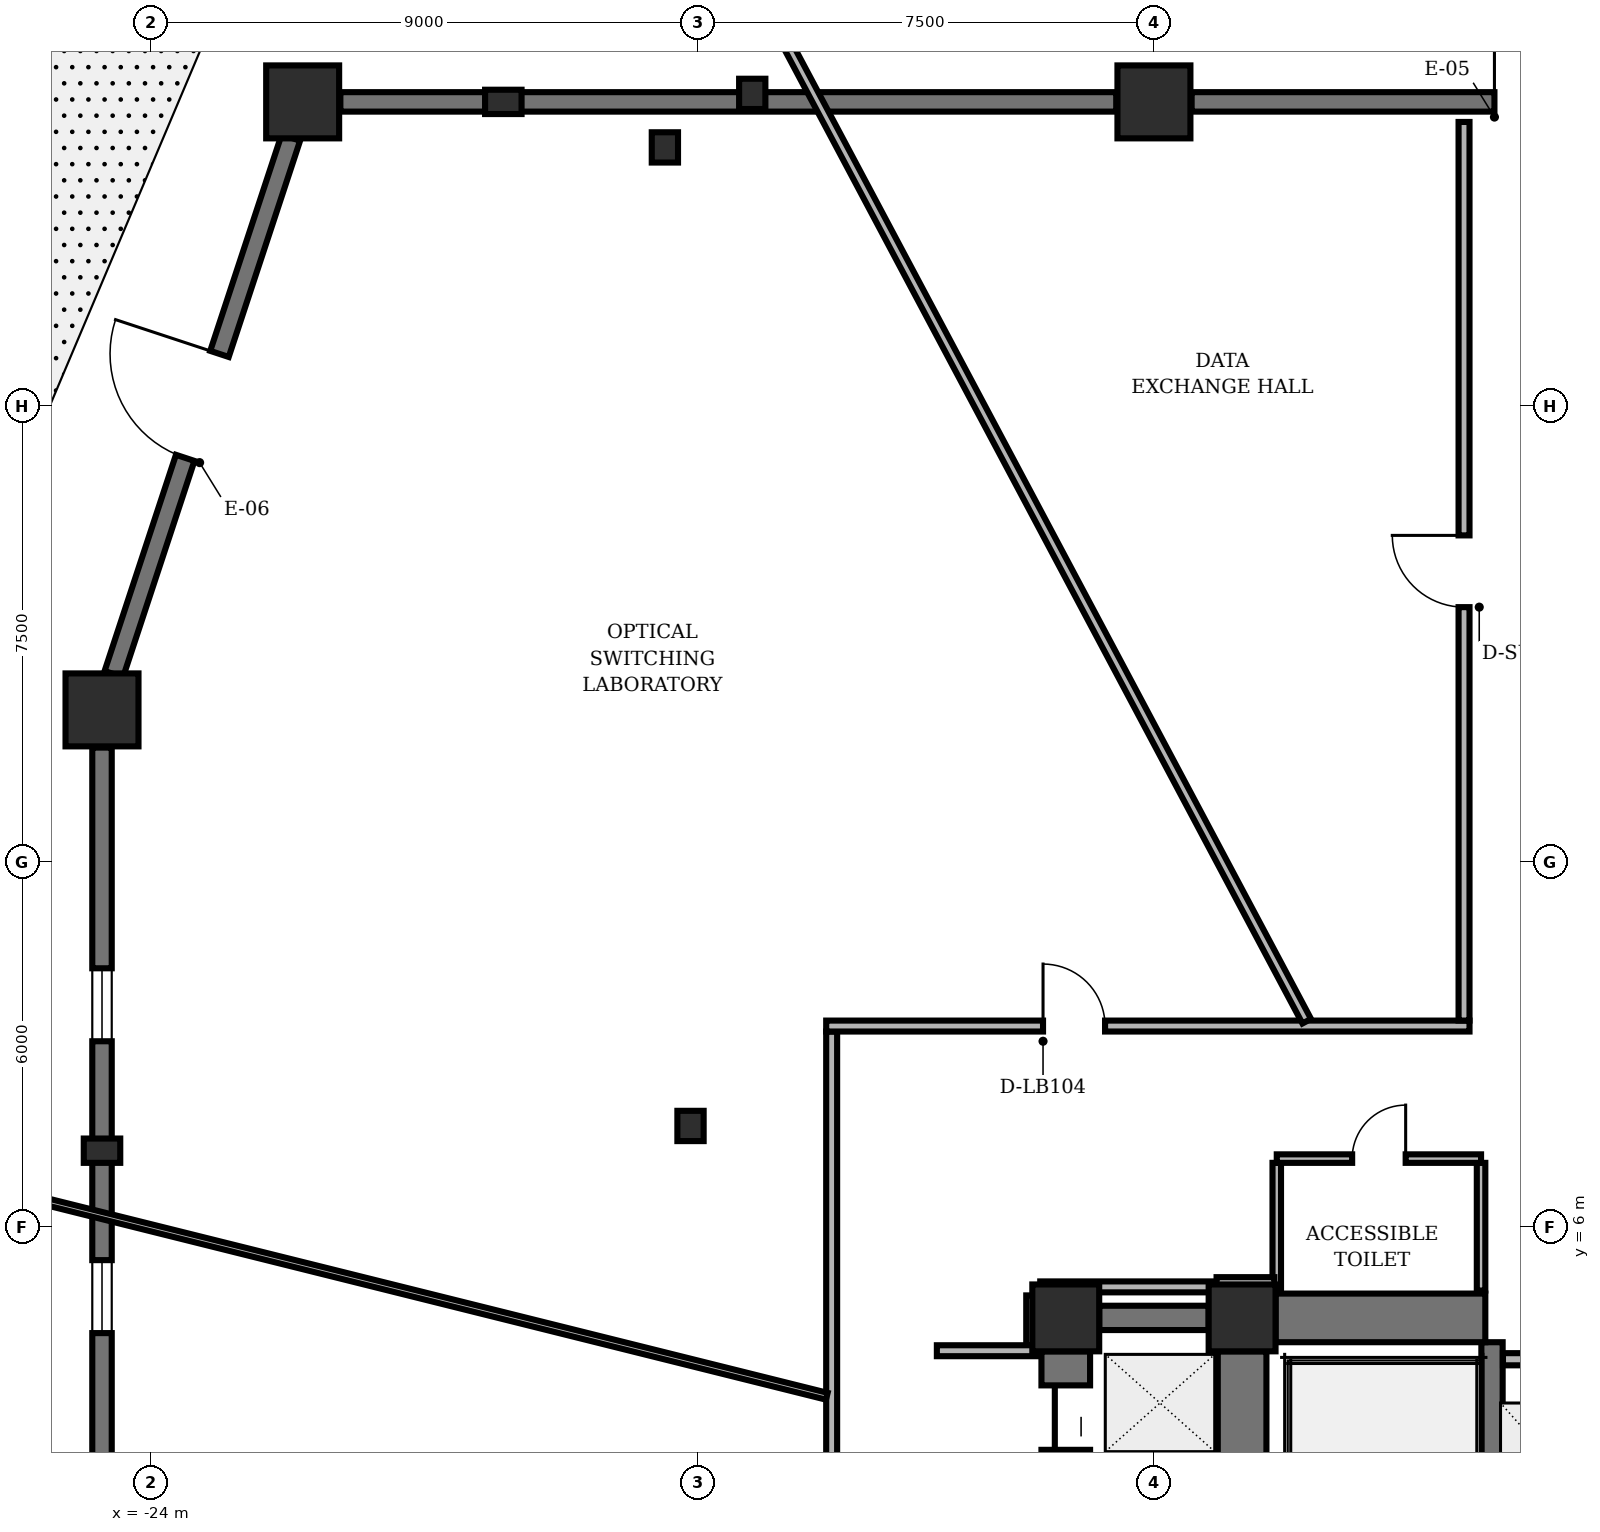
"""IFC4 building model, lengths in metres.
Left out: names, types, materials, properties, quantities, classifications, styles, units other than length and angle.
Written with IfcOpenShell. Run it as: python <this file> out.ifc"""

import sys

from ifc_helpers import new_model, si_unit, direction, frame, frame_2d, origin, origin_2d, place, context, subcontext, project, spatial, rectangle, hollow_rectangle, i_section, extrude, element, fill, save


model = new_model("IFC4")
c1 = context("Model", 3, precision=1e-05, world=origin(), true_north=direction((0.0, 1.0)))
c2 = subcontext(c1, "Body", "Model", "MODEL_VIEW")
j1 = project(units=[si_unit("LENGTHUNIT", "METRE"), si_unit("PLANEANGLEUNIT", "RADIAN")], contexts=[c1])
p1 = place(None, origin())
s1 = spatial("IfcSite", under=j1, at=p1, CompositionType="ELEMENT")
p2 = place(p1, origin())
s2 = spatial("IfcBuilding", under=s1, at=p2, CompositionType="ELEMENT")
p3 = place(p2, origin())
s3 = spatial("IfcBuildingStorey", under=s2, at=p3, CompositionType="ELEMENT", Elevation=0.0)
for number, where, z_axis, x_axis in (
    (1, (-6.05, 4.5, 0.0), (0.0, 0.0, 1.0), (1.0, 0.0, 0.0)),
    (2, (-8.95, 4.5, 0.0), (0.0, 0.0, 1.0), (1.0, 0.0, 0.0)),
):
    element("IfcColumn", number, at=place(p3, frame(where, z_axis=z_axis, x_axis=x_axis)), inside=s3, PredefinedType="COLUMN", context=c2, shape_type="SweptSolid", body=[
        extrude(hollow_rectangle(XDim=1.1, YDim=1.1, WallThickness=0.07, InnerFilletRadius=0.02, OuterFilletRadius=0.04, at=origin_2d()), origin(), (0.0, 0.0, 1.0), 4.8),
    ])
p4 = place(p3, frame((-6.05, 0.55, 0.0), z_axis=(0.0, 0.0, 1.0), x_axis=(0.0, 1.0, 0.0)))
e3 = element("IfcWall", 3, at=p4, inside=s3, PredefinedType="SHEAR", context=c2, shape_type="SweptSolid", body=[
    extrude(rectangle(XDim=3.4, YDim=0.8, at=frame_2d((1.7, 0.0))), origin(), (0.0, 0.0, 1.0), 4.498),
])
p5 = place(p3, frame((-1.94, -4.1, 0.0), z_axis=(0.0, 0.0, 1.0), x_axis=(0.0, 1.0, 0.0)))
e4 = element("IfcWall", 4, at=p5, inside=s3, PredefinedType="SHEAR", context=c2, shape_type="SweptSolid", body=[
    extrude(rectangle(XDim=8.2, YDim=0.35, at=frame_2d((4.1, 0.0))), origin(), (0.0, 0.0, 1.0), 4.498),
])
p6 = place(p3, frame((-5.5, 4.5, 0.0), z_axis=(0.0, 0.0, 1.0), x_axis=(1.0, 0.0, 0.0)))
e5 = element("IfcWall", 5, at=p6, inside=s3, PredefinedType="SHEAR", context=c2, shape_type="SweptSolid", body=[
    extrude(rectangle(XDim=3.45, YDim=0.8, at=frame_2d((1.725, 0.0))), origin(), (0.0, 0.0, 1.0), 4.498),
])
p7 = place(p3, frame((-8.95, -3.75, 0.0), z_axis=(0.0, 0.0, 1.0), x_axis=(0.0, 1.0, 0.0)))
e6 = element("IfcWall", 6, at=p7, inside=s3, PredefinedType="SHEAR", context=c2, shape_type="SweptSolid", body=[
    extrude(rectangle(XDim=7.7, YDim=0.8, at=frame_2d((3.85, 0.0))), origin(), (0.0, 0.0, 1.0), 4.498),
])
p8 = place(p7, frame((0.55, 0.0, 0.0)))
e7 = element("IfcOpeningElement", 7, at=p8, cuts=e6, PredefinedType="OPENING", context=c2, shape_type="SweptSolid", body=[
    extrude(rectangle(XDim=1.06, YDim=2.04, at=frame_2d((0.53, 1.02))), frame((0.0, 0.41, 0.0), z_axis=(0.0, -1.0, 0.0), x_axis=(1.0, 0.0, 0.0)), (0.0, 0.0, 1.0), 0.82),
])
p9 = place(p7, frame((3.32, 0.0, 0.0)))
e8 = element("IfcOpeningElement", 8, at=p9, cuts=e6, PredefinedType="OPENING", context=c2, shape_type="SweptSolid", body=[
    extrude(rectangle(XDim=1.06, YDim=2.04, at=frame_2d((0.53, 1.02))), frame((0.0, 0.41, 0.0), z_axis=(0.0, -1.0, 0.0), x_axis=(1.0, 0.0, 0.0)), (0.0, 0.0, 1.0), 0.82),
])
p10 = place(p7, frame((6.08, 0.0, 0.0)))
e9 = element("IfcOpeningElement", 9, at=p10, cuts=e6, PredefinedType="OPENING", context=c2, shape_type="SweptSolid", body=[
    extrude(rectangle(XDim=1.06, YDim=2.04, at=frame_2d((0.53, 1.02))), frame((0.0, 0.41, 0.0), z_axis=(0.0, -1.0, 0.0), x_axis=(1.0, 0.0, 0.0)), (0.0, 0.0, 1.0), 0.82),
])
p11 = place(p3, frame((-8.4, 4.5, 0.0), z_axis=(0.0, 0.0, 1.0), x_axis=(1.0, 0.0, 0.0)))
e10 = element("IfcWall", 10, at=p11, inside=s3, PredefinedType="SHEAR", context=c2, shape_type="SweptSolid", body=[
    extrude(rectangle(XDim=1.8, YDim=0.4, at=frame_2d((0.9, 0.0))), origin(), (0.0, 0.0, 1.0), 4.498),
])
for number, where, z_axis, x_axis in (
    (11, (-7.5, 24.5, 0.0), (0.0, 0.0, 1.0), (1.0, 0.0, 0.0)),
    (12, (-21.5, 24.5, 0.0), (0.0, 0.0, 1.0), (1.0, 0.0, 0.0)),
    (13, (-24.8, 14.5, 0.0), (0.0, 0.0, 1.0), (1.0, 0.0, 0.0)),
):
    element("IfcColumn", number, at=place(p3, frame(where, z_axis=z_axis, x_axis=x_axis)), inside=s3, PredefinedType="COLUMN", context=c2, shape_type="SweptSolid", body=[
        extrude(rectangle(XDim=1.2, YDim=1.2, at=origin_2d()), origin(), (0.0, 0.0, 1.0), 4.8),
    ])
for number, where, z_axis, x_axis in (
    (14, (-14.106, 24.632, 0.0), (0.0, 0.0, 1.0), (1.0, 0.0, 0.0)),
    (15, (-15.543, 23.751, 0.0), (0.0, 0.0, 1.0), (1.0, 0.0, 0.0)),
    (16, (-15.121, 7.657, 0.0), (0.0, 0.0, 1.0), (1.0, 0.0, 0.0)),
):
    element("IfcColumn", number, at=place(p3, frame(where, z_axis=z_axis, x_axis=x_axis)), inside=s3, PredefinedType="COLUMN", context=c2, shape_type="SweptSolid", body=[
        extrude(i_section(OverallWidth=0.432, OverallDepth=0.498, WebThickness=0.056, FlangeThickness=0.089, FilletRadius=0.025, at=origin_2d()), origin(), (0.0, 0.0, 1.0), 4.8),
    ])
for number, where, z_axis, x_axis in (
    (17, (-18.2, 24.5, 0.0), (0.0, 0.0, 1.0), (1.0, 0.0, 0.0)),
    (18, (-24.8, 7.25, 0.0), (0.0, 0.0, 1.0), (1.0, 0.0, 0.0)),
):
    element("IfcColumn", number, at=place(p3, frame(where, z_axis=z_axis, x_axis=x_axis)), inside=s3, PredefinedType="PILASTER", context=c2, shape_type="SweptSolid", body=[
        extrude(rectangle(XDim=0.6, YDim=0.4, at=origin_2d()), origin(), (0.0, 0.0, 1.0), 4.8),
    ])
p12 = place(p3, frame((-6.88, 24.5, 0.0), z_axis=(0.0, 0.0, 1.0), x_axis=(1.0, 0.0, 0.0)))
e19 = element("IfcWall", 19, at=p12, inside=s3, PredefinedType="SOLIDWALL", context=c2, shape_type="SweptSolid", body=[
    extrude(rectangle(XDim=11.76, YDim=0.32, at=frame_2d((5.88, 0.0))), origin(), (0.0, 0.0, 1.0), 3.868),
])
p13 = place(p12, frame((4.98, 0.0, 0.0)))
e20 = element("IfcOpeningElement", 20, at=p13, cuts=e19, PredefinedType="OPENING", context=c2, shape_type="SweptSolid", body=[
    extrude(rectangle(XDim=1.8, YDim=2.3, at=frame_2d((0.9, 1.15))), frame((0.0, 0.17, 0.0), z_axis=(0.0, -1.0, 0.0), x_axis=(1.0, 0.0, 0.0)), (0.0, 0.0, 1.0), 0.34),
])
p14 = place(p3, frame((-20.88, 24.5, 0.0), z_axis=(0.0, 0.0, 1.0), x_axis=(1.0, 0.0, 0.0)))
e21 = element("IfcWall", 21, at=p14, inside=s3, PredefinedType="SOLIDWALL", context=c2, shape_type="SweptSolid", body=[
    extrude(rectangle(XDim=12.76, YDim=0.32, at=frame_2d((6.38, 0.0))), origin(), (0.0, 0.0, 1.0), 3.868),
])
p15 = place(p3, frame((-24.606, 15.089, 0.0), z_axis=(0.0, 0.0, 1.0), x_axis=(0.313380298023, 0.949627710638, 0.0)))
e22 = element("IfcWall", 22, at=p15, inside=s3, PredefinedType="SOLIDWALL", context=c2, shape_type="SweptSolid", body=[
    extrude(rectangle(XDim=9.29, YDim=0.32, at=frame_2d((4.645, 0.0))), origin(), (0.0, 0.0, 1.0), 3.868),
])
p16 = place(p15, frame((3.745, 0.0, 0.0)))
e23 = element("IfcOpeningElement", 23, at=p16, cuts=e22, PredefinedType="OPENING", context=c2, shape_type="SweptSolid", body=[
    extrude(rectangle(XDim=1.8, YDim=2.3, at=frame_2d((0.9, 1.15))), frame((0.0, 0.17, 0.0), z_axis=(0.0, -1.0, 0.0), x_axis=(1.0, 0.0, 0.0)), (0.0, 0.0, 1.0), 0.34),
])
p17 = place(p3, frame((-24.8, 0.62, 0.0), z_axis=(0.0, 0.0, 1.0), x_axis=(0.0, 1.0, 0.0)))
e24 = element("IfcWall", 24, at=p17, inside=s3, PredefinedType="SOLIDWALL", context=c2, shape_type="SweptSolid", body=[
    extrude(rectangle(XDim=13.26, YDim=0.32, at=frame_2d((6.63, 0.0))), origin(), (0.0, 0.0, 1.0), 3.541),
])
p18 = place(p17, frame((3.63, 0.0, 0.65)))
e25 = element("IfcOpeningElement", 25, at=p18, cuts=e24, PredefinedType="OPENING", context=c2, shape_type="SweptSolid", body=[
    extrude(rectangle(XDim=1.2, YDim=1.6, at=frame_2d((0.6, 0.8))), frame((0.0, 0.17, 0.0), z_axis=(0.0, -1.0, 0.0), x_axis=(1.0, 0.0, 0.0)), (0.0, 0.0, 1.0), 0.34),
])
p19 = place(p17, frame((8.43, 0.0, 0.65)))
e26 = element("IfcOpeningElement", 26, at=p19, cuts=e24, PredefinedType="OPENING", context=c2, shape_type="SweptSolid", body=[
    extrude(rectangle(XDim=1.2, YDim=1.6, at=frame_2d((0.6, 0.8))), frame((0.0, 0.17, 0.0), z_axis=(0.0, -1.0, 0.0), x_axis=(1.0, 0.0, 0.0)), (0.0, 0.0, 1.0), 0.34),
])
p20 = place(p3, frame((-1.76, 3.82, 0.0), z_axis=(0.0, 0.0, 1.0), x_axis=(1.0, 0.0, 0.0)))
e27 = element("IfcWall", 27, at=p20, inside=s3, PredefinedType="PARTITIONING", context=c2, shape_type="SweptSolid", body=[
    extrude(rectangle(XDim=3.52, YDim=0.2, at=frame_2d((1.76, 0.0))), origin(), (0.0, 0.0, 1.0), 4.473),
])
p21 = place(p20, frame((0.35, 0.0, 0.0)))
e28 = element("IfcOpeningElement", 28, at=p21, cuts=e27, PredefinedType="OPENING", context=c2, shape_type="SweptSolid", body=[
    extrude(rectangle(XDim=1.06, YDim=2.04, at=frame_2d((0.53, 1.02))), frame((0.0, 0.11, 0.0), z_axis=(0.0, -1.0, 0.0), x_axis=(1.0, 0.0, 0.0)), (0.0, 0.0, 1.0), 0.22),
])
p22 = place(p20, frame((2.11, 0.0, 0.0)))
e29 = element("IfcOpeningElement", 29, at=p22, cuts=e27, PredefinedType="OPENING", context=c2, shape_type="SweptSolid", body=[
    extrude(rectangle(XDim=1.06, YDim=2.04, at=frame_2d((0.53, 1.02))), frame((0.0, 0.11, 0.0), z_axis=(0.0, -1.0, 0.0), x_axis=(1.0, 0.0, 0.0)), (0.0, 0.0, 1.0), 0.22),
])
for number, where, z_axis, x_axis in (
    (30, (-5.48, 4.95, 0.0), (0.0, 0.0, 1.0), (0.0, 1.0, 0.0)),
    (31, (-2.12, 4.95, 0.0), (0.0, 0.0, 1.0), (0.0, 1.0, 0.0)),
):
    element("IfcWall", number, at=place(p3, frame(where, z_axis=z_axis, x_axis=x_axis)), inside=s3, PredefinedType="PARTITIONING", context=c2, shape_type="SweptSolid", body=[
        extrude(rectangle(XDim=2.1, YDim=0.14, at=frame_2d((1.05, 0.0))), origin(), (0.0, 0.0, 1.0), 4.473),
    ])
p23 = place(p3, frame((-5.48, 7.12, 0.0), z_axis=(0.0, 0.0, 1.0), x_axis=(1.0, 0.0, 0.0)))
e32 = element("IfcWall", 32, at=p23, inside=s3, PredefinedType="PARTITIONING", context=c2, shape_type="SweptSolid", body=[
    extrude(rectangle(XDim=3.36, YDim=0.14, at=frame_2d((1.68, 0.0))), origin(), (0.0, 0.0, 1.0), 4.473),
])
p24 = place(p23, frame((1.24, 0.0, 0.0)))
e33 = element("IfcOpeningElement", 33, at=p24, cuts=e32, PredefinedType="OPENING", context=c2, shape_type="SweptSolid", body=[
    extrude(rectangle(XDim=0.88, YDim=2.02, at=frame_2d((0.44, 1.01))), frame((0.0, 0.08, 0.0), z_axis=(0.0, -1.0, 0.0), x_axis=(1.0, 0.0, 0.0)), (0.0, 0.0, 1.0), 0.16),
])
p25 = place(p3, frame((-12.8, -3.61, 0.0), z_axis=(0.0, 0.0, 1.0), x_axis=(0.0, 1.0, 0.0)))
e34 = element("IfcWall", 34, at=p25, inside=s3, PredefinedType="PARTITIONING", context=c2, shape_type="SweptSolid", body=[
    extrude(rectangle(XDim=12.82, YDim=0.18, at=frame_2d((6.41, 0.0))), origin(), (0.0, 0.0, 1.0), 4.473),
])
p26 = place(p3, frame((-12.89, 9.3, 0.0), z_axis=(0.0, 0.0, 1.0), x_axis=(1.0, 0.0, 0.0)))
e35 = element("IfcWall", 35, at=p26, inside=s3, PredefinedType="PARTITIONING", context=c2, shape_type="SweptSolid", body=[
    extrude(rectangle(XDim=10.58, YDim=0.18, at=frame_2d((5.29, 0.0))), origin(), (0.0, 0.0, 1.0), 3.987),
])
p27 = place(p26, frame((3.566, 0.0, 0.0)))
e36 = element("IfcOpeningElement", 36, at=p27, cuts=e35, PredefinedType="OPENING", context=c2, shape_type="SweptSolid", body=[
    extrude(rectangle(XDim=1.02, YDim=2.02, at=frame_2d((0.51, 1.01))), frame((0.0, 0.1, 0.0), z_axis=(0.0, -1.0, 0.0), x_axis=(1.0, 0.0, 0.0)), (0.0, 0.0, 1.0), 0.2),
])
p28 = place(p3, frame((-2.4, 9.39, 0.0), z_axis=(0.0, 0.0, 1.0), x_axis=(0.0, 1.0, 0.0)))
e37 = element("IfcWall", 37, at=p28, inside=s3, PredefinedType="PARTITIONING", context=c2, shape_type="SweptSolid", body=[
    extrude(rectangle(XDim=14.78, YDim=0.18, at=frame_2d((7.39, 0.0))), origin(), (0.0, 0.0, 1.0), 4.473),
])
p29 = place(p28, frame((6.8, 0.0, 0.0)))
e38 = element("IfcOpeningElement", 38, at=p29, cuts=e37, PredefinedType="OPENING", context=c2, shape_type="SweptSolid", body=[
    extrude(rectangle(XDim=1.18, YDim=2.02, at=frame_2d((0.59, 1.01))), frame((0.0, 0.1, 0.0), z_axis=(0.0, -1.0, 0.0), x_axis=(1.0, 0.0, 0.0)), (0.0, 0.0, 1.0), 0.2),
])
p30 = place(p3, frame((-5.52, 5.08, 0.0), z_axis=(0.0, 0.0, 1.0), x_axis=(-1.0, 0.0, 0.0)))
e39 = element("IfcWall", 39, at=p30, inside=s3, PredefinedType="PARTITIONING", context=c2, shape_type="SweptSolid", body=[
    extrude(rectangle(XDim=0.95, YDim=0.18, at=frame_2d((0.475, 0.0))), origin(), (0.0, 0.0, 1.0), 4.473),
])
p31 = place(p3, frame((-6.562, 5.01, 0.0), z_axis=(0.0, 0.0, 1.0), x_axis=(-1.0, 0.0, 0.0)))
e40 = element("IfcWall", 40, at=p31, inside=s3, PredefinedType="PARTITIONING", context=c2, shape_type="SweptSolid", body=[
    extrude(rectangle(XDim=2.808, YDim=0.18, at=frame_2d((1.404, 0.0))), origin(), (0.0, 0.0, 1.0), 4.473),
])
p32 = place(p3, frame((-9.51, 4.87, 0.0), z_axis=(0.0, 0.0, 1.0), x_axis=(0.0, -1.0, 0.0)))
e41 = element("IfcWall", 41, at=p32, inside=s3, PredefinedType="PARTITIONING", context=c2, shape_type="SweptSolid", body=[
    extrude(rectangle(XDim=0.82, YDim=0.18, at=frame_2d((0.41, 0.0))), origin(), (0.0, 0.0, 1.0), 4.473),
])
p33 = place(p3, frame((-9.42, 3.96, 0.0), z_axis=(0.0, 0.0, 1.0), x_axis=(-1.0, 0.0, 0.0)))
e42 = element("IfcWall", 42, at=p33, inside=s3, PredefinedType="PARTITIONING", context=c2, shape_type="SweptSolid", body=[
    extrude(rectangle(XDim=1.65, YDim=0.18, at=frame_2d((0.825, 0.0))), origin(), (0.0, 0.0, 1.0), 4.473),
])
p34 = place(p3, frame((-4.987, 9.38, 0.0), z_axis=(0.0, 0.0, 1.0), x_axis=(-0.469474122014, 0.882946232088, 0.0)))
e43 = element("IfcWall", 43, at=p34, inside=s3, PredefinedType="PARTITIONING", context=c2, shape_type="SweptSolid", body=[
    extrude(rectangle(XDim=19.888, YDim=0.16, at=frame_2d((9.944, 0.0))), origin(), (0.0, 0.0, 1.0), 4.473),
])
p35 = place(p3, frame((-12.88, 3.211, 0.0), z_axis=(0.0, 0.0, 1.0), x_axis=(-0.97029281794, 0.241933560001, 0.0)))
e44 = element("IfcWall", 44, at=p35, inside=s3, PredefinedType="MOVABLE", context=c2, shape_type="SweptSolid", body=[
    extrude(rectangle(XDim=14.027, YDim=0.115, at=frame_2d((7.013, 0.0))), origin(), (0.0, 0.0, 1.0), 4.473),
])
p36 = place(p13, origin())
e45 = element("IfcDoor", 45, at=p36, inside=s3, OperationType="SINGLE_SWING_LEFT", PredefinedType="DOOR", context=c2, shape_type="SweptSolid", body=[
    extrude(rectangle(XDim=1.8, YDim=2.3, at=frame_2d((0.9, 1.15))), frame((0.0, 0.025, 0.0), z_axis=(0.0, -1.0, 0.0), x_axis=(1.0, 0.0, 0.0)), (0.0, 0.0, 1.0), 0.05),
])
fill(e20, e45)
p37 = place(p16, origin())
e46 = element("IfcDoor", 46, at=p37, inside=s3, OperationType="SINGLE_SWING_RIGHT", PredefinedType="DOOR", context=c2, shape_type="SweptSolid", body=[
    extrude(rectangle(XDim=1.8, YDim=2.3, at=frame_2d((0.9, 1.15))), frame((0.0, 0.025, 0.0), z_axis=(0.0, -1.0, 0.0), x_axis=(1.0, 0.0, 0.0)), (0.0, 0.0, 1.0), 0.05),
])
fill(e23, e46)
p38 = place(p18, origin())
e47 = element("IfcWindow", 47, at=p38, inside=s3, PartitioningType="SINGLE_PANEL", PredefinedType="WINDOW", context=c2, shape_type="SweptSolid", body=[
    extrude(rectangle(XDim=1.2, YDim=1.6, at=frame_2d((0.6, 0.8))), frame((0.0, 0.03, 0.0), z_axis=(0.0, -1.0, 0.0), x_axis=(1.0, 0.0, 0.0)), (0.0, 0.0, 1.0), 0.06),
])
fill(e25, e47)
p39 = place(p19, origin())
e48 = element("IfcWindow", 48, at=p39, inside=s3, PartitioningType="SINGLE_PANEL", PredefinedType="WINDOW", context=c2, shape_type="SweptSolid", body=[
    extrude(rectangle(XDim=1.2, YDim=1.6, at=frame_2d((0.6, 0.8))), frame((0.0, 0.03, 0.0), z_axis=(0.0, -1.0, 0.0), x_axis=(1.0, 0.0, 0.0)), (0.0, 0.0, 1.0), 0.06),
])
fill(e26, e48)
p40 = place(p24, origin())
e49 = element("IfcDoor", 49, at=p40, inside=s3, OperationType="SINGLE_SWING_RIGHT", PredefinedType="DOOR", context=c2, shape_type="SweptSolid", body=[
    extrude(rectangle(XDim=0.88, YDim=2.02, at=frame_2d((0.44, 1.01))), frame((0.0, 0.025, 0.0), z_axis=(0.0, -1.0, 0.0), x_axis=(1.0, 0.0, 0.0)), (0.0, 0.0, 1.0), 0.05),
])
fill(e33, e49)
p41 = place(p10, origin())
e50 = element("IfcDoor", 50, at=p41, inside=s3, OperationType="SLIDING_TO_LEFT", PredefinedType="DOOR", context=c2, shape_type="SweptSolid", body=[
    extrude(rectangle(XDim=1.06, YDim=2.04, at=frame_2d((0.53, 1.02))), frame((0.0, 0.025, 0.0), z_axis=(0.0, -1.0, 0.0), x_axis=(1.0, 0.0, 0.0)), (0.0, 0.0, 1.0), 0.05),
])
fill(e9, e50)
p42 = place(p29, origin())
e51 = element("IfcDoor", 51, at=p42, inside=s3, OperationType="SINGLE_SWING_RIGHT", PredefinedType="DOOR", context=c2, shape_type="SweptSolid", body=[
    extrude(rectangle(XDim=1.18, YDim=2.02, at=frame_2d((0.59, 1.01))), frame((0.0, 0.025, 0.0), z_axis=(0.0, -1.0, 0.0), x_axis=(1.0, 0.0, 0.0)), (0.0, 0.0, 1.0), 0.05),
])
fill(e38, e51)
p43 = place(p27, origin())
e52 = element("IfcDoor", 52, at=p43, inside=s3, OperationType="SINGLE_SWING_LEFT", PredefinedType="DOOR", context=c2, shape_type="SweptSolid", body=[
    extrude(rectangle(XDim=1.02, YDim=2.02, at=frame_2d((0.51, 1.01))), frame((0.0, 0.025, 0.0), z_axis=(0.0, -1.0, 0.0), x_axis=(1.0, 0.0, 0.0)), (0.0, 0.0, 1.0), 0.05),
])
fill(e36, e52)
save(model, sys.argv[1])
